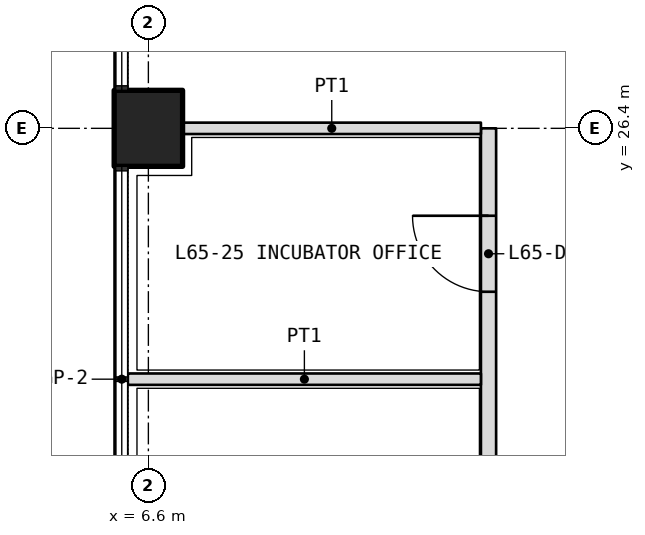
"""IFC4 building model, lengths in metres.
Left out: names, types, materials, properties, quantities, classifications, styles, units other than length and angle.
Written with IfcOpenShell. Run it as: python <this file> out.ifc"""

import sys

from ifc_helpers import new_model, si_unit, direction, frame, frame_2d, origin, origin_2d, place, context, subcontext, project, spatial, rectangle, extrude, element, fill, save


model = new_model("IFC4")
c1 = context("Model", 3, precision=1e-05, world=origin(), true_north=direction((0.0, 1.0)))
c2 = subcontext(c1, "Body", "Model", "MODEL_VIEW")
j1 = project(units=[si_unit("LENGTHUNIT", "METRE"), si_unit("PLANEANGLEUNIT", "RADIAN")], contexts=[c1])
p1 = place(None, origin())
s1 = spatial("IfcSite", under=j1, at=p1, CompositionType="ELEMENT")
p2 = place(p1, origin())
s2 = spatial("IfcBuilding", under=s1, at=p2, CompositionType="ELEMENT")
p3 = place(p2, frame((0.0, 0.0, 283.8)))
s3 = spatial("IfcBuildingStorey", under=s2, at=p3, CompositionType="ELEMENT", Elevation=283.8)
p4 = place(p3, frame((6.6, 26.4, 0.0), z_axis=(0.0, 0.0, 1.0), x_axis=(0.0, 1.0, 0.0)))
e1 = element("IfcColumn", 1, at=p4, inside=s3, PredefinedType="COLUMN", context=c2, shape_type="SweptSolid", body=[
    extrude(rectangle(XDim=1.0, YDim=0.9, at=origin_2d()), origin(), (0.0, 0.0, 1.0), 4.2),
])
p5 = place(p3, frame((11.075, 7.4, 0.0), z_axis=(0.0, 0.0, 1.0), x_axis=(0.0, 1.0, 0.0)))
e2 = element("IfcWall", 2, at=p5, inside=s3, PredefinedType="PARTITIONING", context=c2, shape_type="SweptSolid", body=[
    extrude(rectangle(XDim=19.0, YDim=0.2, at=frame_2d((9.5, 0.0))), origin(), (0.0, 0.0, 1.0), 3.0),
])
p6 = place(p5, frame((2.35, 0.0, 0.0)))
e3 = element("IfcOpeningElement", 3, at=p6, cuts=e2, PredefinedType="OPENING", context=c2, shape_type="SweptSolid", body=[
    extrude(rectangle(XDim=1.0, YDim=2.1, at=frame_2d((0.5, 1.05))), frame((0.0, 0.11, 0.0), z_axis=(0.0, -1.0, 0.0), x_axis=(1.0, 0.0, 0.0)), (0.0, 0.0, 1.0), 0.22),
])
p7 = place(p5, frame((6.35, 0.0, 0.0)))
e4 = element("IfcOpeningElement", 4, at=p7, cuts=e2, PredefinedType="OPENING", context=c2, shape_type="SweptSolid", body=[
    extrude(rectangle(XDim=1.0, YDim=2.1, at=frame_2d((0.5, 1.05))), frame((0.0, 0.11, 0.0), z_axis=(0.0, -1.0, 0.0), x_axis=(1.0, 0.0, 0.0)), (0.0, 0.0, 1.0), 0.22),
])
p8 = place(p5, frame((9.45, 0.0, 0.0)))
e5 = element("IfcOpeningElement", 5, at=p8, cuts=e2, PredefinedType="OPENING", context=c2, shape_type="SweptSolid", body=[
    extrude(rectangle(XDim=0.9, YDim=2.1, at=frame_2d((0.45, 1.05))), frame((0.0, 0.11, 0.0), z_axis=(0.0, -1.0, 0.0), x_axis=(1.0, 0.0, 0.0)), (0.0, 0.0, 1.0), 0.22),
])
p9 = place(p5, frame((13.35, 0.0, 0.0)))
e6 = element("IfcOpeningElement", 6, at=p9, cuts=e2, PredefinedType="OPENING", context=c2, shape_type="SweptSolid", body=[
    extrude(rectangle(XDim=0.9, YDim=2.1, at=frame_2d((0.45, 1.05))), frame((0.0, 0.11, 0.0), z_axis=(0.0, -1.0, 0.0), x_axis=(1.0, 0.0, 0.0)), (0.0, 0.0, 1.0), 0.22),
])
p10 = place(p5, frame((16.85, 0.0, 0.0)))
e7 = element("IfcOpeningElement", 7, at=p10, cuts=e2, PredefinedType="OPENING", context=c2, shape_type="SweptSolid", body=[
    extrude(rectangle(XDim=1.0, YDim=2.1, at=frame_2d((0.5, 1.05))), frame((0.0, 0.11, 0.0), z_axis=(0.0, -1.0, 0.0), x_axis=(1.0, 0.0, 0.0)), (0.0, 0.0, 1.0), 0.22),
])
p11 = place(p3, frame((6.33, 23.1, 0.0), z_axis=(0.0, 0.0, 1.0), x_axis=(1.0, 0.0, 0.0)))
e8 = element("IfcWall", 8, at=p11, inside=s3, PredefinedType="PARTITIONING", context=c2, shape_type="SweptSolid", body=[
    extrude(rectangle(XDim=4.645, YDim=0.15, at=frame_2d((2.323, 0.0))), origin(), (0.0, 0.0, 1.0), 2.7),
])
p12 = place(p3, frame((7.05, 26.4, 0.0), z_axis=(0.0, 0.0, 1.0), x_axis=(1.0, 0.0, 0.0)))
e9 = element("IfcWall", 9, at=p12, inside=s3, PredefinedType="PARTITIONING", context=c2, shape_type="SweptSolid", body=[
    extrude(rectangle(XDim=3.925, YDim=0.15, at=frame_2d((1.962, 0.0))), origin(), (0.0, 0.0, 1.0), 3.0),
])
p13 = place(p10, origin())
e10 = element("IfcDoor", 10, at=p13, inside=s3, OperationType="SINGLE_SWING_RIGHT", PredefinedType="DOOR", context=c2, shape_type="SweptSolid", body=[
    extrude(rectangle(XDim=1.0, YDim=2.1, at=frame_2d((0.5, 1.05))), frame((0.0, 0.025, 0.0), z_axis=(0.0, -1.0, 0.0), x_axis=(1.0, 0.0, 0.0)), (0.0, 0.0, 1.0), 0.05),
])
fill(e7, e10)
save(model, sys.argv[1])
